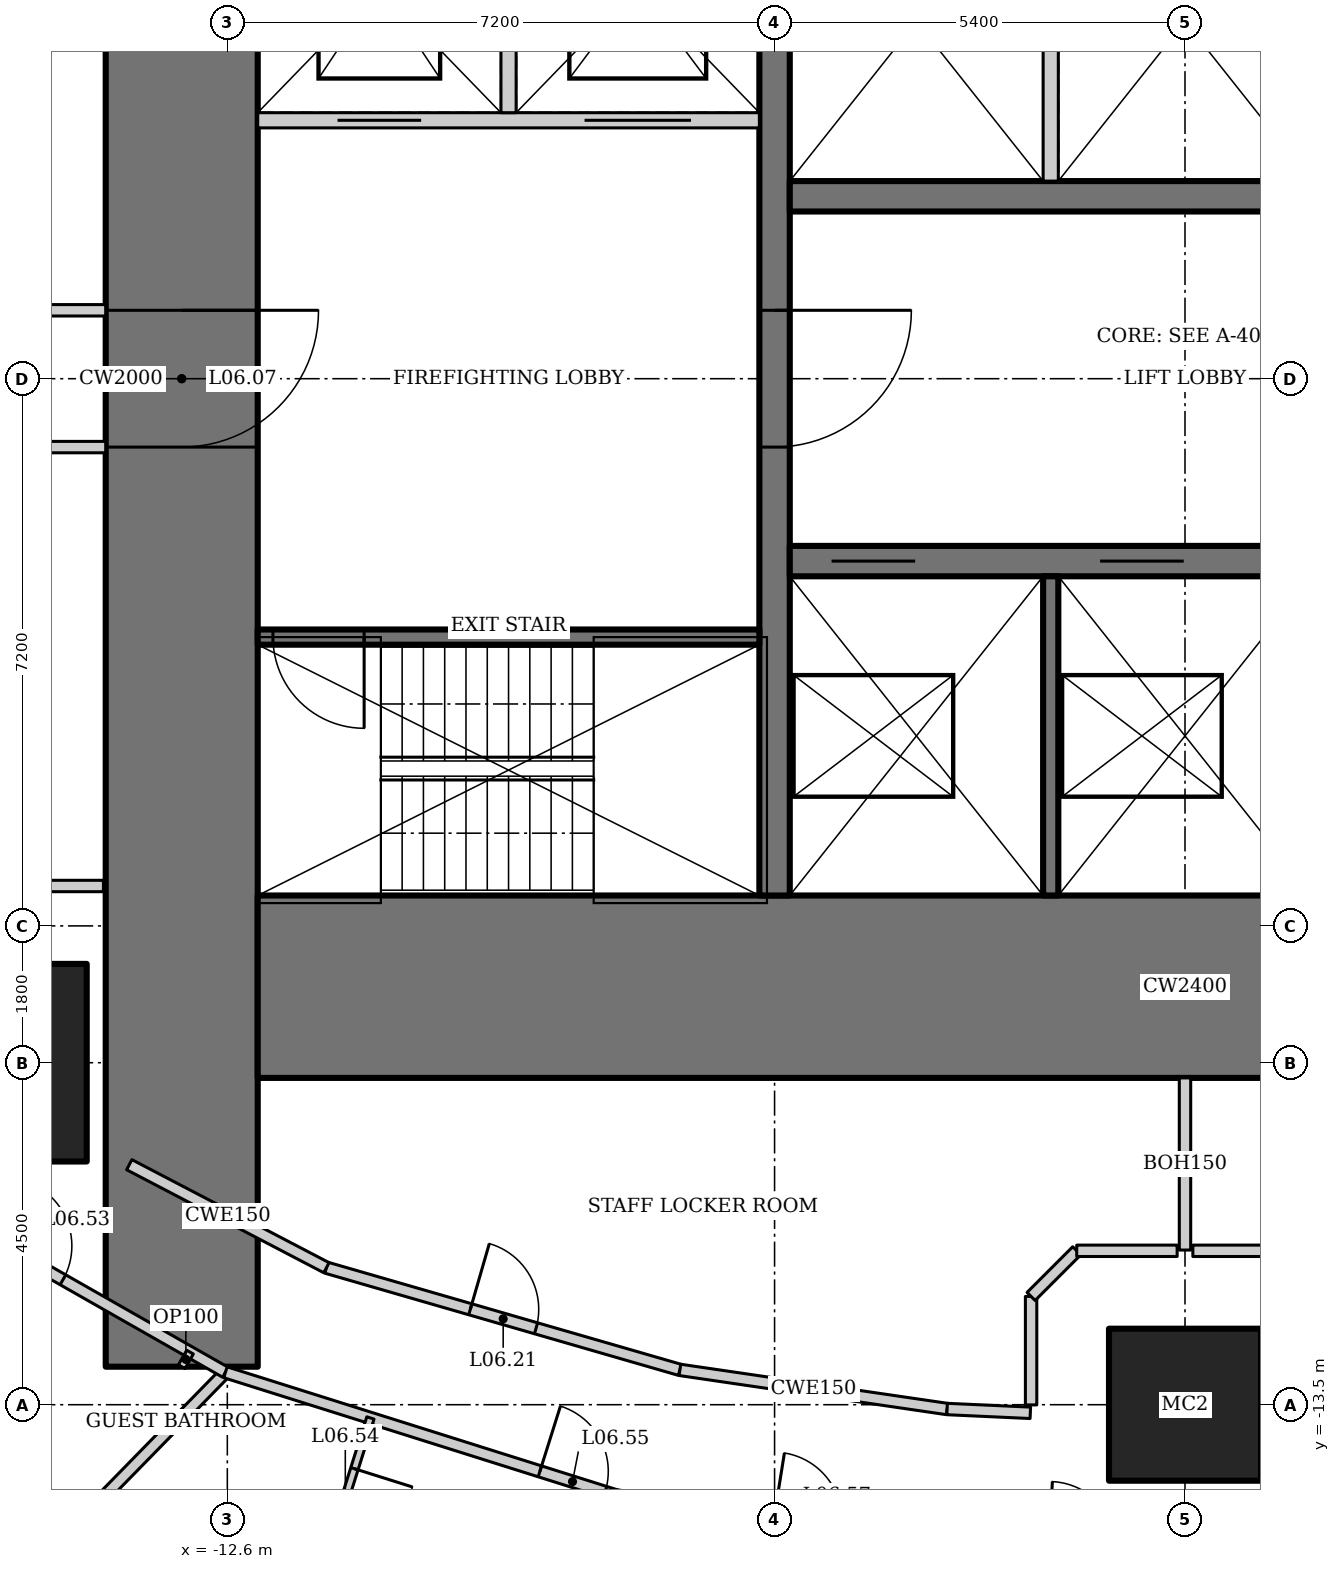
"""IFC4 building model, lengths in metres.
Left out: names, types, materials, properties, quantities, classifications, styles, units other than length and angle.
Written with IfcOpenShell. Run it as: python <this file> out.ifc"""

import sys

from ifc_helpers import new_model, si_unit, direction, frame, frame_2d, origin, origin_2d, place, context, subcontext, project, spatial, rectangle, hollow_rectangle, extrude, element, fill, save


model = new_model("IFC4")
c1 = context("Model", 3, precision=1e-05, world=origin(), true_north=direction((0.0, 1.0)))
c2 = subcontext(c1, "Body", "Model", "MODEL_VIEW")
j1 = project(units=[si_unit("LENGTHUNIT", "METRE"), si_unit("PLANEANGLEUNIT", "RADIAN")], contexts=[c1])
p1 = place(None, origin())
s1 = spatial("IfcSite", under=j1, at=p1, CompositionType="ELEMENT")
p2 = place(p1, origin())
s2 = spatial("IfcBuilding", under=s1, at=p2, CompositionType="ELEMENT")
p3 = place(p2, frame((0.0, 0.0, 37.0)))
s3 = spatial("IfcBuildingStorey", under=s2, at=p3, CompositionType="ELEMENT", Elevation=37.0)
p4 = place(p3, frame((-15.75, -9.0, 0.0), z_axis=(0.0, 0.0, 1.0), x_axis=(1.0, 0.0, 0.0)))
e1 = element("IfcColumn", 1, at=p4, inside=s3, PredefinedType="COLUMN", context=c2, shape_type="SweptSolid", body=[
    extrude(hollow_rectangle(XDim=2.6, YDim=2.6, WallThickness=0.13, at=origin_2d()), origin(), (0.0, 0.0, 1.0), 3.6),
])
p5 = place(p3, frame((0.0, -13.5, 0.0), z_axis=(0.0, 0.0, 1.0), x_axis=(1.0, 0.0, 0.0)))
e2 = element("IfcColumn", 2, at=p5, inside=s3, PredefinedType="COLUMN", context=c2, shape_type="SweptSolid", body=[
    extrude(hollow_rectangle(XDim=2.0, YDim=2.0, WallThickness=0.17, at=origin_2d()), origin(), (0.0, 0.0, 1.0), 3.6),
])
p6 = place(p3, frame((-13.2, 13.0, 0.0), z_axis=(0.0, 0.0, 1.0), x_axis=(0.0, -1.0, 0.0)))
e3 = element("IfcWall", 3, at=p6, inside=s3, PredefinedType="SHEAR", context=c2, shape_type="SweptSolid", body=[
    extrude(rectangle(XDim=26.0, YDim=2.0, at=frame_2d((13.0, 0.0))), origin(), (0.0, 0.0, 1.0), 3.6),
])
p7 = place(p6, frame((12.1, 0.0, 0.0)))
e4 = element("IfcOpeningElement", 4, at=p7, cuts=e3, PredefinedType="OPENING", context=c2, shape_type="SweptSolid", body=[
    extrude(rectangle(XDim=1.8, YDim=2.1, at=frame_2d((0.9, 1.05))), frame((0.0, 1.01, 0.0), z_axis=(0.0, -1.0, 0.0), x_axis=(1.0, 0.0, 0.0)), (0.0, 0.0, 1.0), 2.02),
])
p8 = place(p3, frame((-12.2, -8.0, 0.0), z_axis=(0.0, 0.0, 1.0), x_axis=(1.0, 0.0, 0.0)))
e5 = element("IfcWall", 5, at=p8, inside=s3, PredefinedType="SHEAR", context=c2, shape_type="SweptSolid", body=[
    extrude(rectangle(XDim=24.4, YDim=2.4, at=frame_2d((12.2, 0.0))), origin(), (0.0, 0.0, 1.0), 3.6),
])
p9 = place(p3, frame((-5.4, 6.8, 0.0), z_axis=(0.0, 0.0, 1.0), x_axis=(0.0, -1.0, 0.0)))
e6 = element("IfcWall", 6, at=p9, inside=s3, PredefinedType="SHEAR", context=c2, shape_type="SweptSolid", body=[
    extrude(rectangle(XDim=13.6, YDim=0.4, at=frame_2d((6.8, 0.0))), origin(), (0.0, 0.0, 1.0), 3.6),
])
p10 = place(p9, frame((5.9, 0.0, 0.0)))
e7 = element("IfcOpeningElement", 7, at=p10, cuts=e6, PredefinedType="OPENING", context=c2, shape_type="SweptSolid", body=[
    extrude(rectangle(XDim=1.8, YDim=2.1, at=frame_2d((0.9, 1.05))), frame((0.0, 0.21, 0.0), z_axis=(0.0, -1.0, 0.0), x_axis=(1.0, 0.0, 0.0)), (0.0, 0.0, 1.0), 0.42),
])
p11 = place(p3, frame((-5.2, -2.4, 0.0), z_axis=(0.0, 0.0, 1.0), x_axis=(1.0, 0.0, 0.0)))
e8 = element("IfcWall", 8, at=p11, inside=s3, PredefinedType="SHEAR", context=c2, shape_type="SweptSolid", body=[
    extrude(rectangle(XDim=10.4, YDim=0.4, at=frame_2d((5.2, 0.0))), origin(), (0.0, 0.0, 1.0), 3.6),
])
p12 = place(p11, frame((0.55, 0.0, 0.0)))
e9 = element("IfcOpeningElement", 9, at=p12, cuts=e8, PredefinedType="OPENING", context=c2, shape_type="SweptSolid", body=[
    extrude(rectangle(XDim=1.1, YDim=2.2, at=frame_2d((0.55, 1.1))), frame((0.0, 0.21, 0.0), z_axis=(0.0, -1.0, 0.0), x_axis=(1.0, 0.0, 0.0)), (0.0, 0.0, 1.0), 0.42),
])
p13 = place(p11, frame((4.083, 0.0, 0.0)))
e10 = element("IfcOpeningElement", 10, at=p13, cuts=e8, PredefinedType="OPENING", context=c2, shape_type="SweptSolid", body=[
    extrude(rectangle(XDim=1.1, YDim=2.2, at=frame_2d((0.55, 1.1))), frame((0.0, 0.21, 0.0), z_axis=(0.0, -1.0, 0.0), x_axis=(1.0, 0.0, 0.0)), (0.0, 0.0, 1.0), 0.42),
])
p14 = place(p11, frame((7.617, 0.0, 0.0)))
e11 = element("IfcOpeningElement", 11, at=p14, cuts=e8, PredefinedType="OPENING", context=c2, shape_type="SweptSolid", body=[
    extrude(rectangle(XDim=1.1, YDim=2.2, at=frame_2d((0.55, 1.1))), frame((0.0, 0.21, 0.0), z_axis=(0.0, -1.0, 0.0), x_axis=(1.0, 0.0, 0.0)), (0.0, 0.0, 1.0), 0.42),
])
p15 = place(p3, frame((-1.767, -2.6, 0.0), z_axis=(0.0, 0.0, 1.0), x_axis=(0.0, -1.0, 0.0)))
e12 = element("IfcWall", 12, at=p15, inside=s3, PredefinedType="SOLIDWALL", context=c2, shape_type="SweptSolid", body=[
    extrude(rectangle(XDim=4.2, YDim=0.2, at=frame_2d((2.1, 0.0))), origin(), (0.0, 0.0, 1.0), 3.6),
])
p16 = place(p3, frame((5.2, 2.4, 0.0), z_axis=(0.0, 0.0, 1.0), x_axis=(-1.0, 0.0, 0.0)))
e13 = element("IfcWall", 13, at=p16, inside=s3, PredefinedType="SHEAR", context=c2, shape_type="SweptSolid", body=[
    extrude(rectangle(XDim=10.4, YDim=0.4, at=frame_2d((5.2, 0.0))), origin(), (0.0, 0.0, 1.0), 3.6),
])
p17 = place(p3, frame((-1.767, 2.6, 0.0), z_axis=(0.0, 0.0, 1.0), x_axis=(0.0, 1.0, 0.0)))
e14 = element("IfcWall", 14, at=p17, inside=s3, PredefinedType="SOLIDWALL", context=c2, shape_type="SweptSolid", body=[
    extrude(rectangle(XDim=4.2, YDim=0.2, at=frame_2d((2.1, 0.0))), origin(), (0.0, 0.0, 1.0), 3.6),
])
p18 = place(p3, frame((-5.6, -3.4, 0.0), z_axis=(0.0, 0.0, 1.0), x_axis=(-1.0, 0.0, 0.0)))
e15 = element("IfcWall", 15, at=p18, inside=s3, PredefinedType="SHEAR", context=c2, shape_type="SweptSolid", body=[
    extrude(rectangle(XDim=6.6, YDim=0.2, at=frame_2d((3.3, 0.0))), origin(), (0.0, 0.0, 1.0), 3.6),
])
p19 = place(p18, frame((5.2, 0.0, 0.0)))
e16 = element("IfcOpeningElement", 16, at=p19, cuts=e15, PredefinedType="OPENING", context=c2, shape_type="SweptSolid", body=[
    extrude(rectangle(XDim=1.2, YDim=2.1, at=frame_2d((0.6, 1.05))), frame((0.0, 0.11, 0.0), z_axis=(0.0, -1.0, 0.0), x_axis=(1.0, 0.0, 0.0)), (0.0, 0.0, 1.0), 0.22),
])
p20 = place(p3, frame((-12.2, 3.4, 0.0), z_axis=(0.0, 0.0, 1.0), x_axis=(1.0, 0.0, 0.0)))
e17 = element("IfcWall", 17, at=p20, inside=s3, PredefinedType="SOLIDWALL", context=c2, shape_type="SweptSolid", body=[
    extrude(rectangle(XDim=6.6, YDim=0.2, at=frame_2d((3.3, 0.0))), origin(), (0.0, 0.0, 1.0), 3.6),
])
p21 = place(p20, frame((1.05, 0.0, 0.0)))
e18 = element("IfcOpeningElement", 18, at=p21, cuts=e17, PredefinedType="OPENING", context=c2, shape_type="SweptSolid", body=[
    extrude(rectangle(XDim=1.1, YDim=2.2, at=frame_2d((0.55, 1.1))), frame((0.0, 0.11, 0.0), z_axis=(0.0, -1.0, 0.0), x_axis=(1.0, 0.0, 0.0)), (0.0, 0.0, 1.0), 0.22),
])
p22 = place(p20, frame((4.3, 0.0, 0.0)))
e19 = element("IfcOpeningElement", 19, at=p22, cuts=e17, PredefinedType="OPENING", context=c2, shape_type="SweptSolid", body=[
    extrude(rectangle(XDim=1.4, YDim=2.2, at=frame_2d((0.7, 1.1))), frame((0.0, 0.11, 0.0), z_axis=(0.0, -1.0, 0.0), x_axis=(1.0, 0.0, 0.0)), (0.0, 0.0, 1.0), 0.22),
])
p23 = place(p3, frame((-8.9, 3.5, 0.0), z_axis=(0.0, 0.0, 1.0), x_axis=(0.0, 1.0, 0.0)))
e20 = element("IfcWall", 20, at=p23, inside=s3, PredefinedType="SOLIDWALL", context=c2, shape_type="SweptSolid", body=[
    extrude(rectangle(XDim=3.3, YDim=0.2, at=frame_2d((1.65, 0.0))), origin(), (0.0, 0.0, 1.0), 3.6),
])
p24 = place(p3, frame((-17.97, -18.542, 0.0), z_axis=(0.0, 0.0, 1.0), x_axis=(0.699032031211, 0.715090357467, 0.0)))
e21 = element("IfcWall", 21, at=p24, inside=s3, PredefinedType="PARTITIONING", context=c2, shape_type="SweptSolid", body=[
    extrude(rectangle(XDim=7.647, YDim=0.15, at=frame_2d((3.824, 0.0))), origin(), (0.0, 0.0, 1.0), 2.528),
])
p25 = place(p3, frame((-17.761, -10.149, 0.0), z_axis=(0.0, 0.0, 1.0), x_axis=(0.86907565943, -0.494679187136, 0.0)))
e22 = element("IfcWall", 22, at=p25, inside=s3, PredefinedType="PARTITIONING", context=c2, shape_type="SweptSolid", body=[
    extrude(rectangle(XDim=5.911, YDim=0.15, at=frame_2d((2.955, 0.0))), origin(), (0.0, 0.0, 1.0), 3.45),
])
p26 = place(p25, frame((2.55, 0.0, 0.0)))
e23 = element("IfcOpeningElement", 23, at=p26, cuts=e22, PredefinedType="OPENING", context=c2, shape_type="SweptSolid", body=[
    extrude(rectangle(XDim=0.9, YDim=2.1, at=frame_2d((0.45, 1.05))), frame((0.0, 0.085, 0.0), z_axis=(0.0, -1.0, 0.0), x_axis=(1.0, 0.0, 0.0)), (0.0, 0.0, 1.0), 0.17),
])
p27 = place(p3, frame((-12.625, -13.073, 0.0), z_axis=(0.0, 0.0, 1.0), x_axis=(0.953774229808, -0.30052407317, 0.0)))
e24 = element("IfcWall", 24, at=p27, inside=s3, PredefinedType="PARTITIONING", context=c2, shape_type="SweptSolid", body=[
    extrude(rectangle(XDim=5.388, YDim=0.15, at=frame_2d((2.694, 0.0))), origin(), (0.0, 0.0, 1.0), 3.45),
])
p28 = place(p27, frame((4.338, 0.0, 0.0)))
e25 = element("IfcOpeningElement", 25, at=p28, cuts=e24, PredefinedType="OPENING", context=c2, shape_type="SweptSolid", body=[
    extrude(rectangle(XDim=0.9, YDim=2.1, at=frame_2d((0.45, 1.05))), frame((0.0, 0.085, 0.0), z_axis=(0.0, -1.0, 0.0), x_axis=(1.0, 0.0, 0.0)), (0.0, 0.0, 1.0), 0.17),
])
p29 = place(p3, frame((-11.296, -11.698, 0.0), z_axis=(0.0, 0.0, 1.0), x_axis=(0.960678318068, -0.277663770041, 0.0)))
e26 = element("IfcWall", 26, at=p29, inside=s3, PredefinedType="PARTITIONING", context=c2, shape_type="SweptSolid", body=[
    extrude(rectangle(XDim=4.841, YDim=0.15, at=frame_2d((2.421, 0.0))), origin(), (0.0, 0.0, 1.0), 3.45),
])
p30 = place(p29, frame((1.971, 0.0, 0.0)))
e27 = element("IfcOpeningElement", 27, at=p30, cuts=e26, PredefinedType="OPENING", context=c2, shape_type="SweptSolid", body=[
    extrude(rectangle(XDim=0.9, YDim=2.1, at=frame_2d((0.45, 1.05))), frame((0.0, 0.085, 0.0), z_axis=(0.0, -1.0, 0.0), x_axis=(1.0, 0.0, 0.0)), (0.0, 0.0, 1.0), 0.17),
])
p31 = place(p3, frame((-6.645, -13.042, 0.0), z_axis=(0.0, 0.0, 1.0), x_axis=(0.989443047021, -0.14492224364, 0.0)))
e28 = element("IfcWall", 28, at=p31, inside=s3, PredefinedType="PARTITIONING", context=c2, shape_type="SweptSolid", body=[
    extrude(rectangle(XDim=3.553, YDim=0.15, at=frame_2d((1.776, 0.0))), origin(), (0.0, 0.0, 1.0), 3.45),
])
p32 = place(p3, frame((-10.717, -13.674, 0.0), z_axis=(0.0, 0.0, 1.0), x_axis=(-0.30049839721, -0.953782319649, 0.0)))
e29 = element("IfcWall", 29, at=p32, inside=s3, PredefinedType="PARTITIONING", context=c2, shape_type="SweptSolid", body=[
    extrude(rectangle(XDim=2.4, YDim=0.1, at=frame_2d((1.2, 0.0))), origin(), (0.0, 0.0, 1.0), 3.45),
])
p33 = place(p32, frame((0.7, 0.0, 0.0)))
e30 = element("IfcOpeningElement", 30, at=p33, cuts=e29, PredefinedType="OPENING", context=c2, shape_type="SweptSolid", body=[
    extrude(rectangle(XDim=0.8, YDim=2.1, at=frame_2d((0.4, 1.05))), frame((0.0, 0.06, 0.0), z_axis=(0.0, -1.0, 0.0), x_axis=(1.0, 0.0, 0.0)), (0.0, 0.0, 1.0), 0.12),
])
p34 = place(p3, frame((-13.2, -13.0, 0.0), z_axis=(0.0, 0.0, 1.0), x_axis=(0.49435138335, 0.869262164011, 0.0)))
e31 = element("IfcWall", 31, at=p34, inside=s3, PredefinedType="PARTITIONING", context=c2, shape_type="SweptSolid", body=[
    extrude(rectangle(XDim=0.221, YDim=0.1, at=frame_2d((0.11, 0.0))), origin(), (0.0, 0.0, 1.0), 3.45),
])
for number, where, z_axis, x_axis in (
    (32, (-14.2, -0.9, 0.0), (0.0, 0.0, 1.0), (-1.0, 0.0, 0.0)),
    (33, (-14.2, 0.9, 0.0), (0.0, 0.0, 1.0), (-1.0, 0.0, 0.0)),
):
    element("IfcWall", number, at=place(p3, frame(where, z_axis=z_axis, x_axis=x_axis)), inside=s3, PredefinedType="PARTITIONING", context=c2, shape_type="SweptSolid", body=[
        extrude(rectangle(XDim=0.965, YDim=0.15, at=frame_2d((0.482, 0.0))), origin(), (0.0, 0.0, 1.0), 3.45),
    ])
p35 = place(p3, frame((-13.89, -10.342, 0.0), z_axis=(0.0, 0.0, 1.0), x_axis=(0.886275255135, -0.463158905922, 0.0)))
e34 = element("IfcWall", 34, at=p35, inside=s3, PredefinedType="PARTITIONING", context=c2, shape_type="SweptSolid", body=[
    extrude(rectangle(XDim=2.927, YDim=0.15, at=frame_2d((1.463, 0.0))), origin(), (0.0, 0.0, 1.0), 3.45),
])
p36 = place(p3, frame((-17.475, -6.675, 0.0), z_axis=(0.0, 0.0, 1.0), x_axis=(1.0, 0.0, 0.0)))
e35 = element("IfcWall", 35, at=p36, inside=s3, PredefinedType="PARTITIONING", context=c2, shape_type="SweptSolid", body=[
    extrude(rectangle(XDim=3.245, YDim=0.15, at=frame_2d((1.622, 0.0))), origin(), (0.0, 0.0, 1.0), 3.45),
])
p37 = place(p3, frame((-3.13, -13.557, 0.0), z_axis=(0.0, 0.0, 1.0), x_axis=(0.998946843147, -0.045882508292, 0.0)))
e36 = element("IfcWall", 36, at=p37, inside=s3, PredefinedType="PARTITIONING", context=c2, shape_type="SweptSolid", body=[
    extrude(rectangle(XDim=1.096, YDim=0.15, at=frame_2d((0.548, 0.0))), origin(), (0.0, 0.0, 1.0), 3.45),
])
p38 = place(p3, frame((0.0, -9.2, 0.0), z_axis=(0.0, 0.0, 1.0), x_axis=(0.0, -1.0, 0.0)))
e37 = element("IfcWall", 37, at=p38, inside=s3, PredefinedType="PARTITIONING", context=c2, shape_type="SweptSolid", body=[
    extrude(rectangle(XDim=2.265, YDim=0.15, at=frame_2d((1.133, 0.0))), origin(), (0.0, 0.0, 1.0), 3.044),
])
p39 = place(p3, frame((-2.025, -13.503, 0.0), z_axis=(0.0, 0.0, 1.0), x_axis=(0.0, 1.0, 0.0)))
e38 = element("IfcWall", 38, at=p39, inside=s3, PredefinedType="PARTITIONING", context=c2, shape_type="SweptSolid", body=[
    extrude(rectangle(XDim=1.427, YDim=0.15, at=frame_2d((0.714, 0.0))), origin(), (0.0, 0.0, 1.0), 2.749),
])
p40 = place(p3, frame((-2.025, -12.075, 0.0), z_axis=(0.0, 0.0, 1.0), x_axis=(0.707106781187, 0.707106781187, 0.0)))
e39 = element("IfcWall", 39, at=p40, inside=s3, PredefinedType="PARTITIONING", context=c2, shape_type="SweptSolid", body=[
    extrude(rectangle(XDim=0.849, YDim=0.15, at=frame_2d((0.425, 0.0))), origin(), (0.0, 0.0, 1.0), 3.45),
])
for number, where, z_axis, x_axis in (
    (40, (-1.425, -11.475, 0.0), (0.0, 0.0, 1.0), (1.0, 0.0, 0.0)),
    (41, (0.103, -11.475, 0.0), (0.0, 0.0, 1.0), (1.0, 0.0, 0.0)),
):
    element("IfcWall", number, at=place(p3, frame(where, z_axis=z_axis, x_axis=x_axis)), inside=s3, PredefinedType="PARTITIONING", context=c2, shape_type="SweptSolid", body=[
        extrude(rectangle(XDim=1.321, YDim=0.15, at=frame_2d((0.661, 0.0))), origin(), (0.0, 0.0, 1.0), 3.45),
    ])
p41 = place(p10, origin())
e42 = element("IfcDoor", 42, at=p41, inside=s3, OperationType="DOUBLE_DOOR_DOUBLE_SWING", PredefinedType="DOOR", context=c2, shape_type="SweptSolid", body=[
    extrude(rectangle(XDim=1.8, YDim=2.1, at=frame_2d((0.9, 1.05))), frame((0.0, 0.025, 0.0), z_axis=(0.0, -1.0, 0.0), x_axis=(1.0, 0.0, 0.0)), (0.0, 0.0, 1.0), 0.05),
])
fill(e7, e42)
p42 = place(p19, origin())
e43 = element("IfcDoor", 43, at=p42, inside=s3, OperationType="SINGLE_SWING_RIGHT", PredefinedType="DOOR", context=c2, shape_type="SweptSolid", body=[
    extrude(rectangle(XDim=1.2, YDim=2.1, at=frame_2d((0.6, 1.05))), frame((0.0, 0.025, 0.0), z_axis=(0.0, -1.0, 0.0), x_axis=(1.0, 0.0, 0.0)), (0.0, 0.0, 1.0), 0.05),
])
fill(e16, e43)
p43 = place(p7, origin())
e44 = element("IfcDoor", 44, at=p43, inside=s3, OperationType="DOUBLE_DOOR_DOUBLE_SWING", PredefinedType="DOOR", context=c2, shape_type="SweptSolid", body=[
    extrude(rectangle(XDim=1.8, YDim=2.1, at=frame_2d((0.9, 1.05))), frame((0.0, 0.025, 0.0), z_axis=(0.0, -1.0, 0.0), x_axis=(1.0, 0.0, 0.0)), (0.0, 0.0, 1.0), 0.05),
])
fill(e4, e44)
p44 = place(p12, origin())
e45 = element("IfcDoor", 45, at=p44, inside=s3, OperationType="DOUBLE_DOOR_SLIDING", PredefinedType="DOOR", context=c2, shape_type="SweptSolid", body=[
    extrude(rectangle(XDim=1.1, YDim=2.2, at=frame_2d((0.55, 1.1))), frame((0.0, 0.025, 0.0), z_axis=(0.0, -1.0, 0.0), x_axis=(1.0, 0.0, 0.0)), (0.0, 0.0, 1.0), 0.05),
])
fill(e9, e45)
p45 = place(p13, origin())
e46 = element("IfcDoor", 46, at=p45, inside=s3, OperationType="DOUBLE_DOOR_SLIDING", PredefinedType="DOOR", context=c2, shape_type="SweptSolid", body=[
    extrude(rectangle(XDim=1.1, YDim=2.2, at=frame_2d((0.55, 1.1))), frame((0.0, 0.025, 0.0), z_axis=(0.0, -1.0, 0.0), x_axis=(1.0, 0.0, 0.0)), (0.0, 0.0, 1.0), 0.05),
])
fill(e10, e46)
p46 = place(p21, origin())
e47 = element("IfcDoor", 47, at=p46, inside=s3, OperationType="DOUBLE_DOOR_SLIDING", PredefinedType="DOOR", context=c2, shape_type="SweptSolid", body=[
    extrude(rectangle(XDim=1.1, YDim=2.2, at=frame_2d((0.55, 1.1))), frame((0.0, 0.025, 0.0), z_axis=(0.0, -1.0, 0.0), x_axis=(1.0, 0.0, 0.0)), (0.0, 0.0, 1.0), 0.05),
])
fill(e18, e47)
p47 = place(p22, origin())
e48 = element("IfcDoor", 48, at=p47, inside=s3, OperationType="DOUBLE_DOOR_SLIDING", PredefinedType="DOOR", context=c2, shape_type="SweptSolid", body=[
    extrude(rectangle(XDim=1.4, YDim=2.2, at=frame_2d((0.7, 1.1))), frame((0.0, 0.025, 0.0), z_axis=(0.0, -1.0, 0.0), x_axis=(1.0, 0.0, 0.0)), (0.0, 0.0, 1.0), 0.05),
])
fill(e19, e48)
p48 = place(p30, origin())
e49 = element("IfcDoor", 49, at=p48, inside=s3, OperationType="SINGLE_SWING_LEFT", PredefinedType="DOOR", context=c2, shape_type="SweptSolid", body=[
    extrude(rectangle(XDim=0.9, YDim=2.1, at=frame_2d((0.45, 1.05))), frame((0.0, 0.025, 0.0), z_axis=(0.0, -1.0, 0.0), x_axis=(1.0, 0.0, 0.0)), (0.0, 0.0, 1.0), 0.05),
])
fill(e27, e49)
p49 = place(p26, origin())
e50 = element("IfcDoor", 50, at=p49, inside=s3, OperationType="SINGLE_SWING_LEFT", PredefinedType="DOOR", context=c2, shape_type="SweptSolid", body=[
    extrude(rectangle(XDim=0.9, YDim=2.1, at=frame_2d((0.45, 1.05))), frame((0.0, 0.025, 0.0), z_axis=(0.0, -1.0, 0.0), x_axis=(1.0, 0.0, 0.0)), (0.0, 0.0, 1.0), 0.05),
])
fill(e23, e50)
p50 = place(p33, origin())
e51 = element("IfcDoor", 51, at=p50, inside=s3, OperationType="SINGLE_SWING_LEFT", PredefinedType="DOOR", context=c2, shape_type="SweptSolid", body=[
    extrude(rectangle(XDim=0.8, YDim=2.1, at=frame_2d((0.4, 1.05))), frame((0.0, 0.025, 0.0), z_axis=(0.0, -1.0, 0.0), x_axis=(1.0, 0.0, 0.0)), (0.0, 0.0, 1.0), 0.05),
])
fill(e30, e51)
p51 = place(p28, origin())
e52 = element("IfcDoor", 52, at=p51, inside=s3, OperationType="SINGLE_SWING_LEFT", PredefinedType="DOOR", context=c2, shape_type="SweptSolid", body=[
    extrude(rectangle(XDim=0.9, YDim=2.1, at=frame_2d((0.45, 1.05))), frame((0.0, 0.025, 0.0), z_axis=(0.0, -1.0, 0.0), x_axis=(1.0, 0.0, 0.0)), (0.0, 0.0, 1.0), 0.05),
])
fill(e25, e52)
save(model, sys.argv[1])
